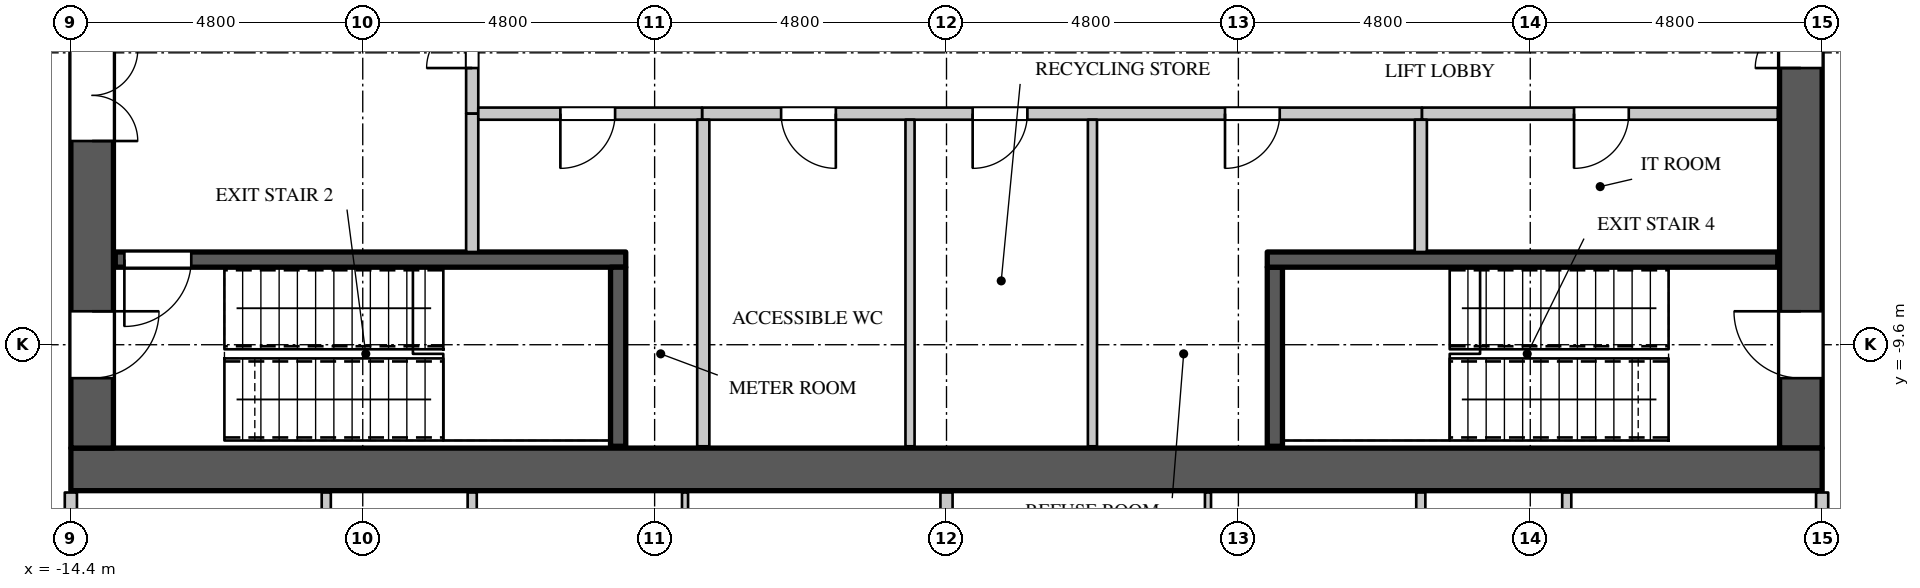
"""IFC4 building model, lengths in metres.
Left out: names, types, materials, properties, quantities, classifications, styles, units other than length and angle.
Written with IfcOpenShell. Run it as: python <this file> out.ifc"""

import sys

from ifc_helpers import new_model, si_unit, direction, frame, frame_2d, origin, place, context, subcontext, project, spatial, rectangle, extrude, element, fill, save


model = new_model("IFC4")
c1 = context("Model", 3, precision=1e-05, world=origin(), true_north=direction((0.0, 1.0)))
c2 = subcontext(c1, "Body", "Model", "MODEL_VIEW")
j1 = project(units=[si_unit("LENGTHUNIT", "METRE"), si_unit("PLANEANGLEUNIT", "RADIAN")], contexts=[c1])
p1 = place(None, origin())
s1 = spatial("IfcSite", under=j1, at=p1, CompositionType="ELEMENT")
p2 = place(p1, origin())
s2 = spatial("IfcBuilding", under=s1, at=p2, CompositionType="ELEMENT")
p3 = place(p2, frame((0.0, 0.0, 174.9)))
s3 = spatial("IfcBuildingStorey", under=s2, at=p3, CompositionType="ELEMENT", Elevation=174.9)
p4 = place(p3, frame((-14.4, -11.65, 0.0), z_axis=(0.0, 0.0, 1.0), x_axis=(1.0, 0.0, 0.0)))
e1 = element("IfcWall", 1, at=p4, inside=s3, PredefinedType="SHEAR", context=c2, shape_type="SweptSolid", body=[
    extrude(rectangle(XDim=28.8, YDim=0.7, at=frame_2d((14.4, 0.0))), origin(), (0.0, 0.0, 1.0), 4.2),
])
p5 = place(p3, frame((14.05, -11.3, 0.0), z_axis=(0.0, 0.0, 1.0), x_axis=(0.0, 1.0, 0.0)))
e2 = element("IfcWall", 2, at=p5, inside=s3, PredefinedType="SHEAR", context=c2, shape_type="SweptSolid", body=[
    extrude(rectangle(XDim=22.6, YDim=0.7, at=frame_2d((11.3, 0.0))), origin(), (0.0, 0.0, 1.0), 4.2),
])
p6 = place(p5, frame((20.35, 0.0, 0.0)))
e3 = element("IfcOpeningElement", 3, at=p6, cuts=e2, PredefinedType="OPENING", context=c2, shape_type="SweptSolid", body=[
    extrude(rectangle(XDim=1.1, YDim=2.2, at=frame_2d((0.55, 1.1))), frame((0.0, 0.36, 0.0), z_axis=(0.0, -1.0, 0.0), x_axis=(1.0, 0.0, 0.0)), (0.0, 0.0, 1.0), 0.72),
])
p7 = place(p5, frame((1.15, 0.0, 0.0)))
e4 = element("IfcOpeningElement", 4, at=p7, cuts=e2, PredefinedType="OPENING", context=c2, shape_type="SweptSolid", body=[
    extrude(rectangle(XDim=1.1, YDim=2.2, at=frame_2d((0.55, 1.1))), frame((0.0, 0.36, 0.0), z_axis=(0.0, -1.0, 0.0), x_axis=(1.0, 0.0, 0.0)), (0.0, 0.0, 1.0), 0.72),
])
p8 = place(p5, frame((14.85, 0.0, 0.0)))
e5 = element("IfcOpeningElement", 5, at=p8, cuts=e2, PredefinedType="OPENING", context=c2, shape_type="SweptSolid", body=[
    extrude(rectangle(XDim=1.5, YDim=2.4, at=frame_2d((0.75, 1.2))), frame((0.0, 0.36, 0.0), z_axis=(0.0, -1.0, 0.0), x_axis=(1.0, 0.0, 0.0)), (0.0, 0.0, 1.0), 0.72),
])
p9 = place(p5, frame((6.25, 0.0, 0.0)))
e6 = element("IfcOpeningElement", 6, at=p9, cuts=e2, PredefinedType="OPENING", context=c2, shape_type="SweptSolid", body=[
    extrude(rectangle(XDim=1.5, YDim=2.4, at=frame_2d((0.75, 1.2))), frame((0.0, 0.36, 0.0), z_axis=(0.0, -1.0, 0.0), x_axis=(1.0, 0.0, 0.0)), (0.0, 0.0, 1.0), 0.72),
])
p10 = place(p3, frame((-14.05, -11.3, 0.0), z_axis=(0.0, 0.0, 1.0), x_axis=(0.0, 1.0, 0.0)))
e7 = element("IfcWall", 7, at=p10, inside=s3, PredefinedType="SHEAR", context=c2, shape_type="SweptSolid", body=[
    extrude(rectangle(XDim=22.6, YDim=0.7, at=frame_2d((11.3, 0.0))), origin(), (0.0, 0.0, 1.0), 4.2),
])
p11 = place(p10, frame((20.35, 0.0, 0.0)))
e8 = element("IfcOpeningElement", 8, at=p11, cuts=e7, PredefinedType="OPENING", context=c2, shape_type="SweptSolid", body=[
    extrude(rectangle(XDim=1.1, YDim=2.2, at=frame_2d((0.55, 1.1))), frame((0.0, 0.36, 0.0), z_axis=(0.0, -1.0, 0.0), x_axis=(1.0, 0.0, 0.0)), (0.0, 0.0, 1.0), 0.72),
])
p12 = place(p10, frame((1.15, 0.0, 0.0)))
e9 = element("IfcOpeningElement", 9, at=p12, cuts=e7, PredefinedType="OPENING", context=c2, shape_type="SweptSolid", body=[
    extrude(rectangle(XDim=1.1, YDim=2.2, at=frame_2d((0.55, 1.1))), frame((0.0, 0.36, 0.0), z_axis=(0.0, -1.0, 0.0), x_axis=(1.0, 0.0, 0.0)), (0.0, 0.0, 1.0), 0.72),
])
p13 = place(p10, frame((16.05, 0.0, 0.0)))
e10 = element("IfcOpeningElement", 10, at=p13, cuts=e7, PredefinedType="OPENING", context=c2, shape_type="SweptSolid", body=[
    extrude(rectangle(XDim=1.5, YDim=2.4, at=frame_2d((0.75, 1.2))), frame((0.0, 0.36, 0.0), z_axis=(0.0, -1.0, 0.0), x_axis=(1.0, 0.0, 0.0)), (0.0, 0.0, 1.0), 0.72),
])
p14 = place(p10, frame((5.05, 0.0, 0.0)))
e11 = element("IfcOpeningElement", 11, at=p14, cuts=e7, PredefinedType="OPENING", context=c2, shape_type="SweptSolid", body=[
    extrude(rectangle(XDim=1.5, YDim=2.4, at=frame_2d((0.75, 1.2))), frame((0.0, 0.36, 0.0), z_axis=(0.0, -1.0, 0.0), x_axis=(1.0, 0.0, 0.0)), (0.0, 0.0, 1.0), 0.72),
])
p15 = place(p3, frame((-14.4, -14.3, 0.0), z_axis=(0.0, 0.0, 1.0), x_axis=(0.0, 1.0, 0.0)))
e12 = element("IfcWall", 12, at=p15, inside=s3, PredefinedType="PARTITIONING", context=c2, shape_type="SweptSolid", body=[
    extrude(rectangle(XDim=2.27, YDim=0.2, at=frame_2d((1.135, 0.0))), origin(), (0.0, 0.0, 1.0), 3.95),
])
p16 = place(p3, frame((-7.8, -5.8, 0.0), z_axis=(0.0, 0.0, 1.0), x_axis=(0.0, 1.0, 0.0)))
e13 = element("IfcWall", 13, at=p16, inside=s3, PredefinedType="PARTITIONING", context=c2, shape_type="SweptSolid", body=[
    extrude(rectangle(XDim=3.0, YDim=0.2, at=frame_2d((1.5, 0.0))), origin(), (0.0, 0.0, 1.0), 3.95),
])
p17 = place(p16, frame((0.75, 0.0, 0.0)))
e14 = element("IfcOpeningElement", 14, at=p17, cuts=e13, PredefinedType="OPENING", context=c2, shape_type="SweptSolid", body=[
    extrude(rectangle(XDim=1.5, YDim=2.4, at=frame_2d((0.75, 1.2))), frame((0.0, 0.11, 0.0), z_axis=(0.0, -1.0, 0.0), x_axis=(1.0, 0.0, 0.0)), (0.0, 0.0, 1.0), 0.22),
])
p18 = place(p3, frame((-4.02, -5.8, 0.0), z_axis=(0.0, 0.0, 1.0), x_axis=(1.0, 0.0, 0.0)))
e15 = element("IfcWall", 15, at=p18, inside=s3, PredefinedType="PARTITIONING", context=c2, shape_type="SweptSolid", body=[
    extrude(rectangle(XDim=11.84, YDim=0.2, at=frame_2d((5.92, 0.0))), origin(), (0.0, 0.0, 1.0), 3.95),
])
p19 = place(p18, frame((1.3, 0.0, 0.0)))
e16 = element("IfcOpeningElement", 16, at=p19, cuts=e15, PredefinedType="OPENING", context=c2, shape_type="SweptSolid", body=[
    extrude(rectangle(XDim=0.9, YDim=2.2, at=frame_2d((0.45, 1.1))), frame((0.0, 0.11, 0.0), z_axis=(0.0, -1.0, 0.0), x_axis=(1.0, 0.0, 0.0)), (0.0, 0.0, 1.0), 0.22),
])
p20 = place(p18, frame((4.45, 0.0, 0.0)))
e17 = element("IfcOpeningElement", 17, at=p20, cuts=e15, PredefinedType="OPENING", context=c2, shape_type="SweptSolid", body=[
    extrude(rectangle(XDim=0.9, YDim=2.2, at=frame_2d((0.45, 1.1))), frame((0.0, 0.11, 0.0), z_axis=(0.0, -1.0, 0.0), x_axis=(1.0, 0.0, 0.0)), (0.0, 0.0, 1.0), 0.22),
])
p21 = place(p18, frame((8.6, 0.0, 0.0)))
e18 = element("IfcOpeningElement", 18, at=p21, cuts=e15, PredefinedType="OPENING", context=c2, shape_type="SweptSolid", body=[
    extrude(rectangle(XDim=0.9, YDim=2.2, at=frame_2d((0.45, 1.1))), frame((0.0, 0.11, 0.0), z_axis=(0.0, -1.0, 0.0), x_axis=(1.0, 0.0, 0.0)), (0.0, 0.0, 1.0), 0.22),
])
p22 = place(p3, frame((14.4, -14.3, 0.0), z_axis=(0.0, 0.0, 1.0), x_axis=(0.0, 1.0, 0.0)))
e19 = element("IfcWall", 19, at=p22, inside=s3, PredefinedType="PARTITIONING", context=c2, shape_type="SweptSolid", body=[
    extrude(rectangle(XDim=2.27, YDim=0.2, at=frame_2d((1.135, 0.0))), origin(), (0.0, 0.0, 1.0), 3.95),
])
p23 = place(p22, frame((0.55, 0.0, 0.0)))
e20 = element("IfcOpeningElement", 20, at=p23, cuts=e19, PredefinedType="OPENING", context=c2, shape_type="SweptSolid", body=[
    extrude(rectangle(XDim=1.1, YDim=2.4, at=frame_2d((0.55, 1.2))), frame((0.0, 0.11, 0.0), z_axis=(0.0, -1.0, 0.0), x_axis=(1.0, 0.0, 0.0)), (0.0, 0.0, 1.0), 0.22),
])
p24 = place(p3, frame((-10.2, -16.275, 0.0), z_axis=(0.0, 0.0, 1.0), x_axis=(0.0, 1.0, 0.0)))
e21 = element("IfcWall", 21, at=p24, inside=s3, PredefinedType="PARTITIONING", context=c2, shape_type="SweptSolid", body=[
    extrude(rectangle(XDim=4.245, YDim=0.15, at=frame_2d((2.123, 0.0))), origin(), (0.0, 0.0, 1.0), 3.95),
])
p25 = place(p24, frame((1.6, 0.0, 0.0)))
e22 = element("IfcOpeningElement", 22, at=p25, cuts=e21, PredefinedType="OPENING", context=c2, shape_type="SweptSolid", body=[
    extrude(rectangle(XDim=0.95, YDim=2.2, at=frame_2d((0.475, 1.1))), frame((0.0, 0.085, 0.0), z_axis=(0.0, -1.0, 0.0), x_axis=(1.0, 0.0, 0.0)), (0.0, 0.0, 1.0), 0.17),
])
p26 = place(p3, frame((-7.8, -16.725, 0.0), z_axis=(0.0, 0.0, 1.0), x_axis=(0.0, 1.0, 0.0)))
e23 = element("IfcWall", 23, at=p26, inside=s3, PredefinedType="PARTITIONING", context=c2, shape_type="SweptSolid", body=[
    extrude(rectangle(XDim=4.695, YDim=0.15, at=frame_2d((2.348, 0.0))), origin(), (0.0, 0.0, 1.0), 3.95),
])
for number, where, z_axis, x_axis in (
    (24, (-0.6, -11.27, 0.0), (0.0, 0.0, 1.0), (0.0, 1.0, 0.0)),
    (25, (2.4, -11.27, 0.0), (0.0, 0.0, 1.0), (0.0, 1.0, 0.0)),
):
    element("IfcWall", number, at=place(p3, frame(where, z_axis=z_axis, x_axis=x_axis)), inside=s3, PredefinedType="PARTITIONING", context=c2, shape_type="SweptSolid", body=[
        extrude(rectangle(XDim=5.37, YDim=0.15, at=frame_2d((2.685, 0.0))), origin(), (0.0, 0.0, 1.0), 3.95),
    ])
p27 = place(p3, frame((7.8, -16.725, 0.0), z_axis=(0.0, 0.0, 1.0), x_axis=(0.0, 1.0, 0.0)))
e26 = element("IfcWall", 26, at=p27, inside=s3, PredefinedType="PARTITIONING", context=c2, shape_type="SweptSolid", body=[
    extrude(rectangle(XDim=4.695, YDim=0.15, at=frame_2d((2.348, 0.0))), origin(), (0.0, 0.0, 1.0), 3.95),
])
p28 = place(p3, frame((10.2, -16.275, 0.0), z_axis=(0.0, 0.0, 1.0), x_axis=(0.0, 1.0, 0.0)))
e27 = element("IfcWall", 27, at=p28, inside=s3, PredefinedType="PARTITIONING", context=c2, shape_type="SweptSolid", body=[
    extrude(rectangle(XDim=4.245, YDim=0.15, at=frame_2d((2.123, 0.0))), origin(), (0.0, 0.0, 1.0), 3.95),
])
p29 = place(p28, frame((1.6, 0.0, 0.0)))
e28 = element("IfcOpeningElement", 28, at=p29, cuts=e27, PredefinedType="OPENING", context=c2, shape_type="SweptSolid", body=[
    extrude(rectangle(XDim=0.95, YDim=2.2, at=frame_2d((0.475, 1.1))), frame((0.0, 0.085, 0.0), z_axis=(0.0, -1.0, 0.0), x_axis=(1.0, 0.0, 0.0)), (0.0, 0.0, 1.0), 0.17),
])
p30 = place(p3, frame((0.0, -24.055, 0.0), z_axis=(0.0, 0.0, 1.0), x_axis=(0.0, 1.0, 0.0)))
e29 = element("IfcWall", 29, at=p30, inside=s3, PredefinedType="PARTITIONING", context=c2, shape_type="SweptSolid", body=[
    extrude(rectangle(XDim=12.025, YDim=0.2, at=frame_2d((6.012, 0.0))), origin(), (0.0, 0.0, 1.0), 3.95),
])
p31 = place(p3, frame((-7.8, -8.075, 0.0), z_axis=(0.0, 0.0, 1.0), x_axis=(0.0, 1.0, 0.0)))
e30 = element("IfcWall", 30, at=p31, inside=s3, PredefinedType="PARTITIONING", context=c2, shape_type="SweptSolid", body=[
    extrude(rectangle(XDim=2.275, YDim=0.2, at=frame_2d((1.137, 0.0))), origin(), (0.0, 0.0, 1.0), 3.95),
])
p32 = place(p3, frame((-7.7, -5.8, 0.0), z_axis=(0.0, 0.0, 1.0), x_axis=(1.0, 0.0, 0.0)))
e31 = element("IfcWall", 31, at=p32, inside=s3, PredefinedType="PARTITIONING", context=c2, shape_type="SweptSolid", body=[
    extrude(rectangle(XDim=3.68, YDim=0.2, at=frame_2d((1.84, 0.0))), origin(), (0.0, 0.0, 1.0), 3.95),
])
p33 = place(p32, frame((1.35, 0.0, 0.0)))
e32 = element("IfcOpeningElement", 32, at=p33, cuts=e31, PredefinedType="OPENING", context=c2, shape_type="SweptSolid", body=[
    extrude(rectangle(XDim=0.9, YDim=2.2, at=frame_2d((0.45, 1.1))), frame((0.0, 0.11, 0.0), z_axis=(0.0, -1.0, 0.0), x_axis=(1.0, 0.0, 0.0)), (0.0, 0.0, 1.0), 0.22),
])
p34 = place(p3, frame((-4.0, -11.27, 0.0), z_axis=(0.0, 0.0, 1.0), x_axis=(0.0, 1.0, 0.0)))
e33 = element("IfcWall", 33, at=p34, inside=s3, PredefinedType="PARTITIONING", context=c2, shape_type="SweptSolid", body=[
    extrude(rectangle(XDim=5.37, YDim=0.2, at=frame_2d((2.685, 0.0))), origin(), (0.0, 0.0, 1.0), 3.95),
])
p35 = place(p3, frame((7.82, -5.8, 0.0), z_axis=(0.0, 0.0, 1.0), x_axis=(1.0, 0.0, 0.0)))
e34 = element("IfcWall", 34, at=p35, inside=s3, PredefinedType="PARTITIONING", context=c2, shape_type="SweptSolid", body=[
    extrude(rectangle(XDim=5.85, YDim=0.2, at=frame_2d((2.925, 0.0))), origin(), (0.0, 0.0, 1.0), 3.95),
])
p36 = place(p35, frame((2.5, 0.0, 0.0)))
e35 = element("IfcOpeningElement", 35, at=p36, cuts=e34, PredefinedType="OPENING", context=c2, shape_type="SweptSolid", body=[
    extrude(rectangle(XDim=0.9, YDim=2.2, at=frame_2d((0.45, 1.1))), frame((0.0, 0.11, 0.0), z_axis=(0.0, -1.0, 0.0), x_axis=(1.0, 0.0, 0.0)), (0.0, 0.0, 1.0), 0.22),
])
p37 = place(p3, frame((7.8, -8.075, 0.0), z_axis=(0.0, 0.0, 1.0), x_axis=(0.0, 1.0, 0.0)))
e36 = element("IfcWall", 36, at=p37, inside=s3, PredefinedType="PARTITIONING", context=c2, shape_type="SweptSolid", body=[
    extrude(rectangle(XDim=2.175, YDim=0.2, at=frame_2d((1.087, 0.0))), origin(), (0.0, 0.0, 1.0), 3.95),
])
p38 = place(p3, frame((-13.67, -8.2, 0.0), z_axis=(0.0, 0.0, 1.0), x_axis=(1.0, 0.0, 0.0)))
e37 = element("IfcWall", 37, at=p38, inside=s3, PredefinedType="SHEAR", context=c2, shape_type="SweptSolid", body=[
    extrude(rectangle(XDim=8.395, YDim=0.25, at=frame_2d((4.198, 0.0))), origin(), (0.0, 0.0, 1.0), 3.95),
])
p39 = place(p38, frame((0.15, 0.0, 0.0)))
e38 = element("IfcOpeningElement", 38, at=p39, cuts=e37, PredefinedType="OPENING", context=c2, shape_type="SweptSolid", body=[
    extrude(rectangle(XDim=1.1, YDim=2.2, at=frame_2d((0.55, 1.1))), frame((0.0, 0.135, 0.0), z_axis=(0.0, -1.0, 0.0), x_axis=(1.0, 0.0, 0.0)), (0.0, 0.0, 1.0), 0.27),
])
for number, where, z_axis, x_axis in (
    (39, (-5.4, -11.27, 0.0), (0.0, 0.0, 1.0), (0.0, 1.0, 0.0)),
    (40, (5.4, -11.27, 0.0), (0.0, 0.0, 1.0), (0.0, 1.0, 0.0)),
):
    element("IfcWall", number, at=place(p3, frame(where, z_axis=z_axis, x_axis=x_axis)), inside=s3, PredefinedType="SHEAR", context=c2, shape_type="SweptSolid", body=[
        extrude(rectangle(XDim=2.945, YDim=0.25, at=frame_2d((1.473, 0.0))), origin(), (0.0, 0.0, 1.0), 3.95),
    ])
p40 = place(p3, frame((5.275, -8.2, 0.0), z_axis=(0.0, 0.0, 1.0), x_axis=(1.0, 0.0, 0.0)))
e41 = element("IfcWall", 41, at=p40, inside=s3, PredefinedType="SHEAR", context=c2, shape_type="SweptSolid", body=[
    extrude(rectangle(XDim=8.395, YDim=0.25, at=frame_2d((4.198, 0.0))), origin(), (0.0, 0.0, 1.0), 3.95),
])
for number, where, z_axis, x_axis in (
    (42, (-4.3, -16.725, 0.0), (0.0, 0.0, 1.0), (0.0, 1.0, 0.0)),
    (43, (4.3, -16.725, 0.0), (0.0, 0.0, 1.0), (0.0, 1.0, 0.0)),
):
    element("IfcWall", number, at=place(p3, frame(where, z_axis=z_axis, x_axis=x_axis)), inside=s3, PredefinedType="PARTITIONING", context=c2, shape_type="SweptSolid", body=[
        extrude(rectangle(XDim=4.695, YDim=0.1, at=frame_2d((2.348, 0.0))), origin(), (0.0, 0.0, 1.0), 3.35),
    ])
p41 = place(p33, origin())
e44 = element("IfcDoor", 44, at=p41, inside=s3, OperationType="SINGLE_SWING_RIGHT", PredefinedType="DOOR", context=c2, shape_type="SweptSolid", body=[
    extrude(rectangle(XDim=0.9, YDim=2.2, at=frame_2d((0.45, 1.1))), frame((0.0, 0.025, 0.0), z_axis=(0.0, -1.0, 0.0), x_axis=(1.0, 0.0, 0.0)), (0.0, 0.0, 1.0), 0.05),
])
fill(e32, e44)
p42 = place(p19, origin())
e45 = element("IfcDoor", 45, at=p42, inside=s3, OperationType="SINGLE_SWING_LEFT", PredefinedType="DOOR", context=c2, shape_type="SweptSolid", body=[
    extrude(rectangle(XDim=0.9, YDim=2.2, at=frame_2d((0.45, 1.1))), frame((0.0, 0.025, 0.0), z_axis=(0.0, -1.0, 0.0), x_axis=(1.0, 0.0, 0.0)), (0.0, 0.0, 1.0), 0.05),
])
fill(e16, e45)
p43 = place(p20, origin())
e46 = element("IfcDoor", 46, at=p43, inside=s3, OperationType="SINGLE_SWING_RIGHT", PredefinedType="DOOR", context=c2, shape_type="SweptSolid", body=[
    extrude(rectangle(XDim=0.9, YDim=2.2, at=frame_2d((0.45, 1.1))), frame((0.0, 0.025, 0.0), z_axis=(0.0, -1.0, 0.0), x_axis=(1.0, 0.0, 0.0)), (0.0, 0.0, 1.0), 0.05),
])
fill(e17, e46)
p44 = place(p21, origin())
e47 = element("IfcDoor", 47, at=p44, inside=s3, OperationType="SINGLE_SWING_RIGHT", PredefinedType="DOOR", context=c2, shape_type="SweptSolid", body=[
    extrude(rectangle(XDim=0.9, YDim=2.2, at=frame_2d((0.45, 1.1))), frame((0.0, 0.025, 0.0), z_axis=(0.0, -1.0, 0.0), x_axis=(1.0, 0.0, 0.0)), (0.0, 0.0, 1.0), 0.05),
])
fill(e18, e47)
p45 = place(p36, origin())
e48 = element("IfcDoor", 48, at=p45, inside=s3, OperationType="SINGLE_SWING_RIGHT", PredefinedType="DOOR", context=c2, shape_type="SweptSolid", body=[
    extrude(rectangle(XDim=0.9, YDim=2.2, at=frame_2d((0.45, 1.1))), frame((0.0, 0.025, 0.0), z_axis=(0.0, -1.0, 0.0), x_axis=(1.0, 0.0, 0.0)), (0.0, 0.0, 1.0), 0.05),
])
fill(e35, e48)
p46 = place(p39, origin())
e49 = element("IfcDoor", 49, at=p46, inside=s3, OperationType="SINGLE_SWING_RIGHT", PredefinedType="DOOR", context=c2, shape_type="SweptSolid", body=[
    extrude(rectangle(XDim=1.1, YDim=2.2, at=frame_2d((0.55, 1.1))), frame((0.0, 0.025, 0.0), z_axis=(0.0, -1.0, 0.0), x_axis=(1.0, 0.0, 0.0)), (0.0, 0.0, 1.0), 0.05),
])
fill(e38, e49)
p47 = place(p17, origin())
e50 = element("IfcDoor", 50, at=p47, inside=s3, OperationType="DOUBLE_DOOR_SINGLE_SWING", PredefinedType="DOOR", context=c2, shape_type="SweptSolid", body=[
    extrude(rectangle(XDim=1.5, YDim=2.4, at=frame_2d((0.75, 1.2))), frame((0.0, 0.025, 0.0), z_axis=(0.0, -1.0, 0.0), x_axis=(1.0, 0.0, 0.0)), (0.0, 0.0, 1.0), 0.05),
])
fill(e14, e50)
p48 = place(p12, origin())
e51 = element("IfcDoor", 51, at=p48, inside=s3, OperationType="SINGLE_SWING_LEFT", PredefinedType="DOOR", context=c2, shape_type="SweptSolid", body=[
    extrude(rectangle(XDim=1.1, YDim=2.2, at=frame_2d((0.55, 1.1))), frame((0.0, -0.295, 0.0), z_axis=(0.0, -1.0, 0.0), x_axis=(1.0, 0.0, 0.0)), (0.0, 0.0, 1.0), 0.05),
])
fill(e9, e51)
p49 = place(p7, origin())
e52 = element("IfcDoor", 52, at=p49, inside=s3, OperationType="SINGLE_SWING_RIGHT", PredefinedType="DOOR", context=c2, shape_type="SweptSolid", body=[
    extrude(rectangle(XDim=1.1, YDim=2.2, at=frame_2d((0.55, 1.1))), frame((0.0, 0.345, 0.0), z_axis=(0.0, -1.0, 0.0), x_axis=(1.0, 0.0, 0.0)), (0.0, 0.0, 1.0), 0.05),
])
fill(e4, e52)
p50 = place(p14, origin())
e53 = element("IfcDoor", 53, at=p50, inside=s3, OperationType="DOUBLE_DOOR_SINGLE_SWING", PredefinedType="DOOR", context=c2, shape_type="SweptSolid", body=[
    extrude(rectangle(XDim=1.5, YDim=2.4, at=frame_2d((0.75, 1.2))), frame((0.0, -0.295, 0.0), z_axis=(0.0, -1.0, 0.0), x_axis=(1.0, 0.0, 0.0)), (0.0, 0.0, 1.0), 0.05),
])
fill(e11, e53)
p51 = place(p9, origin())
e54 = element("IfcDoor", 54, at=p51, inside=s3, OperationType="DOUBLE_DOOR_SINGLE_SWING", PredefinedType="DOOR", context=c2, shape_type="SweptSolid", body=[
    extrude(rectangle(XDim=1.5, YDim=2.4, at=frame_2d((0.75, 1.2))), frame((0.0, 0.345, 0.0), z_axis=(0.0, -1.0, 0.0), x_axis=(1.0, 0.0, 0.0)), (0.0, 0.0, 1.0), 0.05),
])
fill(e6, e54)
save(model, sys.argv[1])
